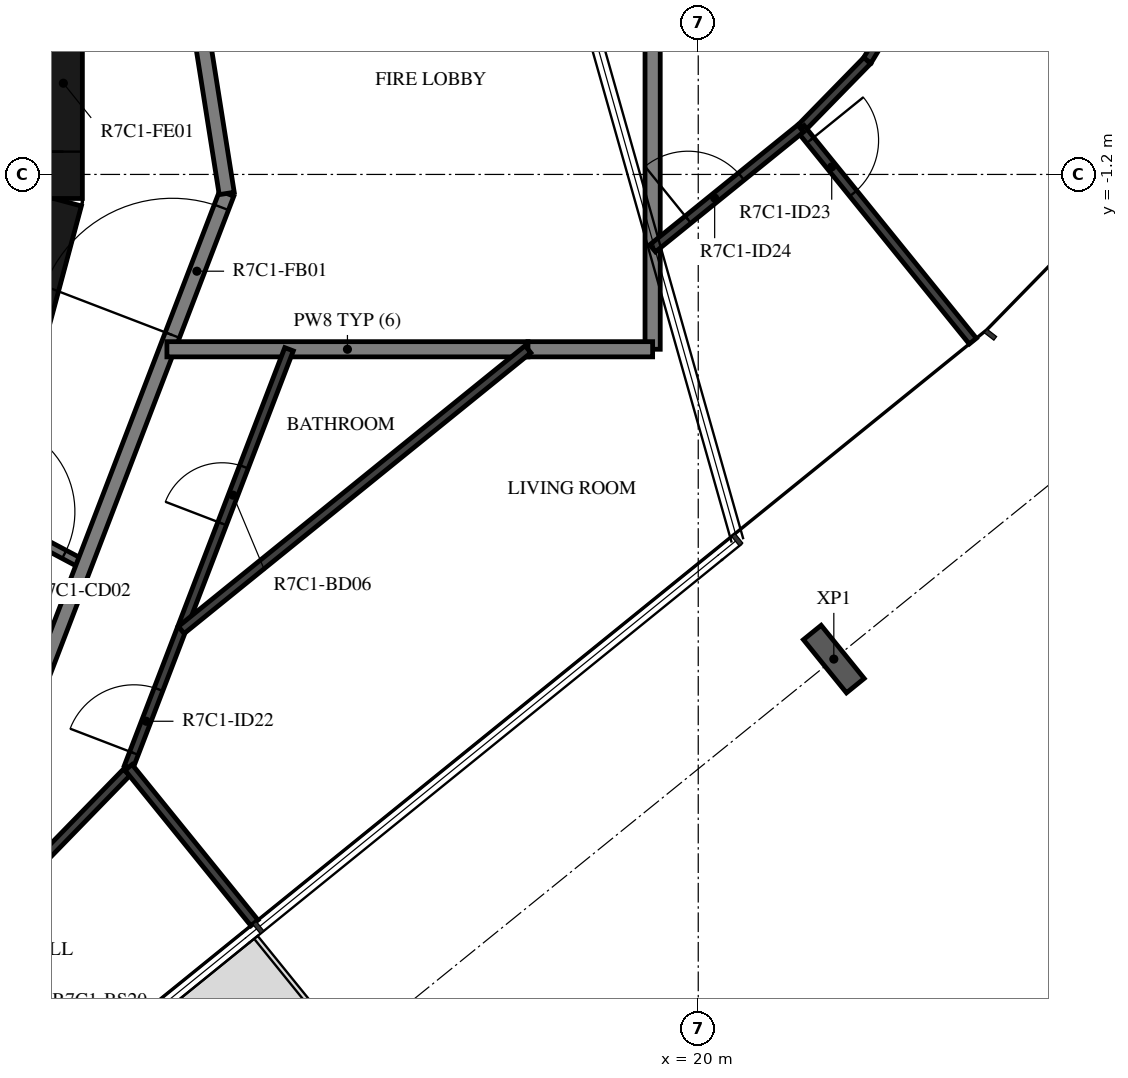
"""IFC4 building model, lengths in metres.
Left out: names, types, materials, properties, quantities, classifications, styles, units other than length and angle.
Written with IfcOpenShell. Run it as: python <this file> out.ifc"""

import sys

from ifc_helpers import new_model, si_unit, direction, frame, frame_2d, origin, origin_2d, place, context, subcontext, project, spatial, rectangle, i_section, extrude, element, fill, save


model = new_model("IFC4")
c1 = context("Model", 3, precision=1e-05, world=origin(), true_north=direction((0.0, 1.0)))
c2 = subcontext(c1, "Body", "Model", "MODEL_VIEW")
j1 = project(units=[si_unit("LENGTHUNIT", "METRE"), si_unit("PLANEANGLEUNIT", "RADIAN")], contexts=[c1])
p1 = place(None, origin())
s1 = spatial("IfcSite", under=j1, at=p1, CompositionType="ELEMENT")
p2 = place(p1, origin())
s2 = spatial("IfcBuilding", under=s1, at=p2, CompositionType="ELEMENT")
p3 = place(p2, frame((0.0, 0.0, 287.9)))
s3 = spatial("IfcBuildingStorey", under=s2, at=p3, CompositionType="ELEMENT", Elevation=287.9)
p4 = place(p3, frame((21.784, -7.576, -0.38), z_axis=(0.0, 0.0, 1.0), x_axis=(-0.777146167973, -0.629320136024, 0.0)))
e1 = element("IfcColumn", 1, at=p4, inside=s3, PredefinedType="COLUMN", context=c2, shape_type="SweptSolid", body=[
    extrude(i_section(OverallWidth=0.3, OverallDepth=0.9, WebThickness=0.019, FlangeThickness=0.035, FilletRadius=0.03, at=origin_2d()), origin(), (0.0, 0.0, 1.0), 2.616),
])
p5 = place(p3, frame((10.858, -4.479, 0.0), z_axis=(0.0, 0.0, 1.0), x_axis=(0.258734743916, 0.965948410781, 0.0)))
e2 = element("IfcWall", 2, at=p5, inside=s3, PredefinedType="SHEAR", context=c2, shape_type="SweptSolid", body=[
    extrude(rectangle(XDim=3.033, YDim=0.5, at=frame_2d((1.516, 0.0))), origin(), (0.0, 0.0, 1.0), 3.05),
])
p6 = place(p3, frame((11.647, -1.516, 0.0), z_axis=(0.0, 0.0, 1.0), x_axis=(0.0, 1.0, 0.0)))
e3 = element("IfcWall", 3, at=p6, inside=s3, PredefinedType="SHEAR", context=c2, shape_type="SweptSolid", body=[
    extrude(rectangle(XDim=3.033, YDim=0.5, at=frame_2d((1.516, 0.0))), origin(), (0.0, 0.0, 1.0), 3.05),
])
p7 = place(p6, frame((0.616, 0.0, 0.0)))
e4 = element("IfcOpeningElement", 4, at=p7, cuts=e3, PredefinedType="OPENING", context=c2, shape_type="SweptSolid", body=[
    extrude(rectangle(XDim=1.8, YDim=2.1, at=frame_2d((0.9, 1.05))), frame((0.0, 0.26, 0.0), z_axis=(0.0, -1.0, 0.0), x_axis=(1.0, 0.0, 0.0)), (0.0, 0.0, 1.0), 0.52),
])
p8 = place(p3, frame((10.511, -5.589, 0.0), z_axis=(0.0, 0.0, 1.0), x_axis=(0.882983002821, -0.469404960273, 0.0)))
e5 = element("IfcWall", 5, at=p8, inside=s3, PredefinedType="PARTITIONING", context=c2, shape_type="SweptSolid", body=[
    extrude(rectangle(XDim=1.596, YDim=0.12, at=frame_2d((0.798, 0.0))), origin(), (0.0, 0.0, 1.0), 3.05),
])
p9 = place(p8, frame((0.1, 0.0, 0.0)))
e6 = element("IfcOpeningElement", 6, at=p9, cuts=e5, PredefinedType="OPENING", context=c2, shape_type="SweptSolid", body=[
    extrude(rectangle(XDim=1.2, YDim=2.1, at=frame_2d((0.6, 1.05))), frame((0.0, 0.07, 0.0), z_axis=(0.0, -1.0, 0.0), x_axis=(1.0, 0.0, 0.0)), (0.0, 0.0, 1.0), 0.14),
])
p10 = place(p3, frame((11.223, -8.154, 0.0), z_axis=(0.0, 0.0, 1.0), x_axis=(0.358341090983, 0.93359073609, 0.0)))
e7 = element("IfcWall", 7, at=p10, inside=s3, PredefinedType="STANDARD", context=c2, shape_type="SweptSolid", body=[
    extrude(rectangle(XDim=7.181, YDim=0.2, at=frame_2d((3.59, 0.0))), origin(), (0.0, 0.0, 1.0), 3.05),
])
p11 = place(p10, frame((5.185, 0.0, 0.0)))
e8 = element("IfcOpeningElement", 8, at=p11, cuts=e7, PredefinedType="OPENING", context=c2, shape_type="SweptSolid", body=[
    extrude(rectangle(XDim=1.8, YDim=2.1, at=frame_2d((0.9, 1.05))), frame((0.0, 0.11, 0.0), z_axis=(0.0, -1.0, 0.0), x_axis=(1.0, 0.0, 0.0)), (0.0, 0.0, 1.0), 0.22),
])
p12 = place(p3, frame((13.797, -1.45, 0.0), z_axis=(0.0, 0.0, 1.0), x_axis=(-0.156421704315, 0.987690361611, 0.0)))
e9 = element("IfcWall", 9, at=p12, inside=s3, PredefinedType="STANDARD", context=c2, shape_type="SweptSolid", body=[
    extrude(rectangle(XDim=7.181, YDim=0.2, at=frame_2d((3.591, 0.0))), origin(), (0.0, 0.0, 1.0), 3.05),
])
p13 = place(p3, frame((13.01, -3.5, 0.0), z_axis=(0.0, 0.0, 1.0), x_axis=(1.0, 0.0, 0.0)))
e10 = element("IfcWall", 10, at=p13, inside=s3, PredefinedType="STANDARD", context=c2, shape_type="SweptSolid", body=[
    extrude(rectangle(XDim=4.75, YDim=0.2, at=frame_2d((2.375, 0.0))), origin(), (0.0, 0.0, 1.0), 3.05),
])
p14 = place(p3, frame((19.4, -3.5, 0.0), z_axis=(0.0, 0.0, 1.0), x_axis=(0.0, 1.0, 0.0)))
e11 = element("IfcWall", 11, at=p14, inside=s3, PredefinedType="STANDARD", context=c2, shape_type="SweptSolid", body=[
    extrude(rectangle(XDim=5.021, YDim=0.2, at=frame_2d((2.511, 0.0))), origin(), (0.0, 0.0, 1.0), 3.05),
])
p15 = place(p3, frame((17.76, -3.5, 0.0), z_axis=(0.0, 0.0, 1.0), x_axis=(1.0, 0.0, 0.0)))
e12 = element("IfcWall", 12, at=p15, inside=s3, PredefinedType="STANDARD", context=c2, shape_type="SweptSolid", body=[
    extrude(rectangle(XDim=1.64, YDim=0.2, at=frame_2d((0.82, 0.0))), origin(), (0.0, 0.0, 1.0), 3.05),
])
p16 = place(p3, frame((7.007, -14.692, 0.0), z_axis=(0.0, 0.0, 1.0), x_axis=(0.697286714348, 0.716792325568, 0.0)))
e13 = element("IfcWall", 13, at=p16, inside=s3, PredefinedType="PARTITIONING", context=c2, shape_type="SweptSolid", body=[
    extrude(rectangle(XDim=7.848, YDim=0.12, at=frame_2d((3.924, 0.0))), origin(), (0.0, 0.0, 1.0), 3.05),
])
p17 = place(p16, frame((0.2, 0.0, 0.0)))
e14 = element("IfcOpeningElement", 14, at=p17, cuts=e13, PredefinedType="OPENING", context=c2, shape_type="SweptSolid", body=[
    extrude(rectangle(XDim=0.9, YDim=2.1, at=frame_2d((0.45, 1.05))), frame((0.0, 0.07, 0.0), z_axis=(0.0, -1.0, 0.0), x_axis=(1.0, 0.0, 0.0)), (0.0, 0.0, 1.0), 0.14),
])
p18 = place(p3, frame((12.505, -9.001, 0.0), z_axis=(0.0, 0.0, 1.0), x_axis=(0.358373707046, 0.933578216379, 0.0)))
e15 = element("IfcWall", 15, at=p18, inside=s3, PredefinedType="PARTITIONING", context=c2, shape_type="SweptSolid", body=[
    extrude(rectangle(XDim=5.892, YDim=0.12, at=frame_2d((2.946, 0.0))), origin(), (0.0, 0.0, 1.0), 3.05),
])
p19 = place(p18, frame((0.2, 0.0, 0.0)))
e16 = element("IfcOpeningElement", 16, at=p19, cuts=e15, PredefinedType="OPENING", context=c2, shape_type="SweptSolid", body=[
    extrude(rectangle(XDim=0.9, YDim=2.1, at=frame_2d((0.45, 1.05))), frame((0.0, 0.07, 0.0), z_axis=(0.0, -1.0, 0.0), x_axis=(1.0, 0.0, 0.0)), (0.0, 0.0, 1.0), 0.14),
])
p20 = place(p18, frame((3.436, 0.0, 0.0)))
e17 = element("IfcOpeningElement", 17, at=p20, cuts=e15, PredefinedType="OPENING", context=c2, shape_type="SweptSolid", body=[
    extrude(rectangle(XDim=0.8, YDim=2.1, at=frame_2d((0.4, 1.05))), frame((0.0, 0.07, 0.0), z_axis=(0.0, -1.0, 0.0), x_axis=(1.0, 0.0, 0.0)), (0.0, 0.0, 1.0), 0.14),
])
p21 = place(p3, frame((22.746, 1.168, 0.0), z_axis=(0.0, 0.0, 1.0), x_axis=(-0.515096534995, -0.857132171626, 0.0)))
e18 = element("IfcWall", 18, at=p21, inside=s3, PredefinedType="PARTITIONING", context=c2, shape_type="SweptSolid", body=[
    extrude(rectangle(XDim=1.016, YDim=0.12, at=frame_2d((0.508, 0.0))), origin(), (0.0, 0.0, 1.0), 3.05),
])
p22 = place(p3, frame((22.223, 0.298, 0.0), z_axis=(0.0, 0.0, 1.0), x_axis=(-0.69880109182, -0.715316037896, 0.0)))
e19 = element("IfcWall", 19, at=p22, inside=s3, PredefinedType="PARTITIONING", context=c2, shape_type="SweptSolid", body=[
    extrude(rectangle(XDim=1.227, YDim=0.12, at=frame_2d((0.614, 0.0))), origin(), (0.0, 0.0, 1.0), 3.05),
])
p23 = place(p3, frame((21.347, -0.595, 0.0), z_axis=(0.0, 0.0, 1.0), x_axis=(0.62934843781, -0.7771232488, 0.0)))
e20 = element("IfcWall", 20, at=p23, inside=s3, PredefinedType="PARTITIONING", context=c2, shape_type="SweptSolid", body=[
    extrude(rectangle(XDim=3.6, YDim=0.12, at=frame_2d((1.8, 0.0))), origin(), (0.0, 0.0, 1.0), 3.05),
])
p24 = place(p23, frame((0.2, 0.0, 0.0)))
e21 = element("IfcOpeningElement", 21, at=p24, cuts=e20, PredefinedType="OPENING", context=c2, shape_type="SweptSolid", body=[
    extrude(rectangle(XDim=0.9, YDim=2.1, at=frame_2d((0.45, 1.05))), frame((0.0, 0.07, 0.0), z_axis=(0.0, -1.0, 0.0), x_axis=(1.0, 0.0, 0.0)), (0.0, 0.0, 1.0), 0.14),
])
p25 = place(p3, frame((19.4, -2.172, 0.0), z_axis=(0.0, 0.0, 1.0), x_axis=(0.777147279935, 0.629318762862, 0.0)))
e22 = element("IfcWall", 22, at=p25, inside=s3, PredefinedType="PARTITIONING", context=c2, shape_type="SweptSolid", body=[
    extrude(rectangle(XDim=2.505, YDim=0.12, at=frame_2d((1.253, 0.0))), origin(), (0.0, 0.0, 1.0), 3.05),
])
p26 = place(p25, frame((0.6, 0.0, 0.0)))
e23 = element("IfcOpeningElement", 23, at=p26, cuts=e22, PredefinedType="OPENING", context=c2, shape_type="SweptSolid", body=[
    extrude(rectangle(XDim=0.9, YDim=2.1, at=frame_2d((0.45, 1.05))), frame((0.0, 0.07, 0.0), z_axis=(0.0, -1.0, 0.0), x_axis=(1.0, 0.0, 0.0)), (0.0, 0.0, 1.0), 0.14),
])
p27 = place(p3, frame((14.161, -11.046, 0.0), z_axis=(0.0, 0.0, 1.0), x_axis=(-0.62931028473, 0.777154145284, 0.0)))
e24 = element("IfcWall", 24, at=p27, inside=s3, PredefinedType="PARTITIONING", context=c2, shape_type="SweptSolid", body=[
    extrude(rectangle(XDim=2.632, YDim=0.12, at=frame_2d((1.316, 0.0))), origin(), (0.0, 0.0, 1.0), 3.05),
])
p28 = place(p3, frame((17.76, -3.5, 0.0), z_axis=(0.0, 0.0, 1.0), x_axis=(-0.777133455716, -0.62933583404, 0.0)))
e25 = element("IfcWall", 25, at=p28, inside=s3, PredefinedType="PARTITIONING", context=c2, shape_type="SweptSolid", body=[
    extrude(rectangle(XDim=5.869, YDim=0.12, at=frame_2d((2.935, 0.0))), origin(), (0.0, 0.0, 1.0), 3.05),
])
p29 = place(p7, origin())
e26 = element("IfcDoor", 26, at=p29, inside=s3, OperationType="DOUBLE_DOOR_SINGLE_SWING", PredefinedType="DOOR", context=c2, shape_type="SweptSolid", body=[
    extrude(rectangle(XDim=1.8, YDim=2.1, at=frame_2d((0.9, 1.05))), frame((0.0, 0.025, 0.0), z_axis=(0.0, -1.0, 0.0), x_axis=(1.0, 0.0, 0.0)), (0.0, 0.0, 1.0), 0.05),
])
fill(e4, e26)
p30 = place(p19, origin())
e27 = element("IfcDoor", 27, at=p30, inside=s3, OperationType="SINGLE_SWING_RIGHT", PredefinedType="DOOR", context=c2, shape_type="SweptSolid", body=[
    extrude(rectangle(XDim=0.9, YDim=2.1, at=frame_2d((0.45, 1.05))), frame((0.0, 0.025, 0.0), z_axis=(0.0, -1.0, 0.0), x_axis=(1.0, 0.0, 0.0)), (0.0, 0.0, 1.0), 0.05),
])
fill(e16, e27)
p31 = place(p20, origin())
e28 = element("IfcDoor", 28, at=p31, inside=s3, OperationType="SINGLE_SWING_RIGHT", PredefinedType="DOOR", context=c2, shape_type="SweptSolid", body=[
    extrude(rectangle(XDim=0.8, YDim=2.1, at=frame_2d((0.4, 1.05))), frame((0.0, 0.025, 0.0), z_axis=(0.0, -1.0, 0.0), x_axis=(1.0, 0.0, 0.0)), (0.0, 0.0, 1.0), 0.05),
])
fill(e17, e28)
p32 = place(p24, origin())
e29 = element("IfcDoor", 29, at=p32, inside=s3, OperationType="SINGLE_SWING_RIGHT", PredefinedType="DOOR", context=c2, shape_type="SweptSolid", body=[
    extrude(rectangle(XDim=0.9, YDim=2.1, at=frame_2d((0.45, 1.05))), frame((0.0, 0.025, 0.0), z_axis=(0.0, -1.0, 0.0), x_axis=(1.0, 0.0, 0.0)), (0.0, 0.0, 1.0), 0.05),
])
fill(e21, e29)
p33 = place(p26, origin())
e30 = element("IfcDoor", 30, at=p33, inside=s3, OperationType="SINGLE_SWING_LEFT", PredefinedType="DOOR", context=c2, shape_type="SweptSolid", body=[
    extrude(rectangle(XDim=0.9, YDim=2.1, at=frame_2d((0.45, 1.05))), frame((0.0, 0.025, 0.0), z_axis=(0.0, -1.0, 0.0), x_axis=(1.0, 0.0, 0.0)), (0.0, 0.0, 1.0), 0.05),
])
fill(e23, e30)
p34 = place(p9, origin())
e31 = element("IfcDoor", 31, at=p34, inside=s3, OperationType="DOUBLE_DOOR_SINGLE_SWING", PredefinedType="DOOR", context=c2, shape_type="SweptSolid", body=[
    extrude(rectangle(XDim=1.2, YDim=2.1, at=frame_2d((0.6, 1.05))), frame((0.0, 0.025, 0.0), z_axis=(0.0, -1.0, 0.0), x_axis=(1.0, 0.0, 0.0)), (0.0, 0.0, 1.0), 0.05),
])
fill(e6, e31)
p35 = place(p11, origin())
e32 = element("IfcDoor", 32, at=p35, inside=s3, OperationType="DOUBLE_DOOR_SINGLE_SWING", PredefinedType="DOOR", context=c2, shape_type="SweptSolid", body=[
    extrude(rectangle(XDim=1.8, YDim=2.1, at=frame_2d((0.9, 1.05))), frame((0.0, 0.025, 0.0), z_axis=(0.0, -1.0, 0.0), x_axis=(1.0, 0.0, 0.0)), (0.0, 0.0, 1.0), 0.05),
])
fill(e8, e32)
save(model, sys.argv[1])
